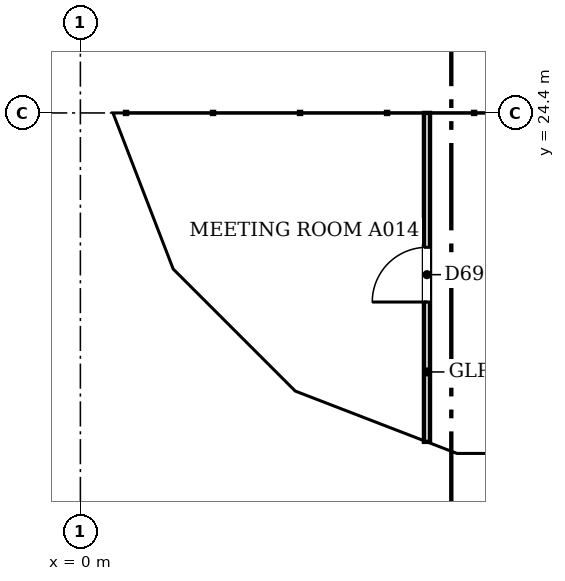
"""IFC4 building model, lengths in metres.
Left out: names, types, materials, properties, quantities, classifications, styles, units other than length and angle.
Written with IfcOpenShell. Run it as: python <this file> out.ifc"""

import sys

from ifc_helpers import new_model, si_unit, direction, frame, frame_2d, origin, place, context, subcontext, project, spatial, polyline, rectangle, outline, extrude, faceted_brep, source, transform, mapped, element, fill, save


model = new_model("IFC4")
c1 = context("Model", 3, precision=1e-05, world=origin(), true_north=direction((0.0, 1.0)))
c2 = subcontext(c1, "Body", "Model", "MODEL_VIEW")
j1 = project(units=[si_unit("LENGTHUNIT", "METRE"), si_unit("PLANEANGLEUNIT", "RADIAN")], contexts=[c1])
p1 = place(None, origin())
s1 = spatial("IfcSite", under=j1, at=p1, CompositionType="ELEMENT")
p2 = place(p1, origin())
s2 = spatial("IfcBuilding", under=s1, at=p2, CompositionType="ELEMENT")
p3 = place(p2, frame((0.0, 0.0, 197.9)))
s3 = spatial("IfcBuildingStorey", under=s2, at=p3, CompositionType="ELEMENT", Elevation=197.9)
m1 = source(origin(), c2, "Body", "Brep", [
    faceted_brep([(6.053, -0.25, 0.0), (3.05, -0.25, 3.8), (0.0, -0.25, 0.0), (0.0, 0.25, 0.0), (3.05, 0.25, 3.8), (6.007, 0.25, 0.059), (6.007, 0.25, 0.0), (6.053, 0.0, 0.0)], [[[0, 1, 2]], [[3, 4, 5, 6]], [[5, 4, 1, 0, 7]], [[4, 3, 2, 1]], [[3, 6, 7, 0, 2]], [[7, 6, 5]]]),
])
p4 = place(p3, frame((0.25, 30.5, 0.0), z_axis=(0.0, 0.0, 1.0), x_axis=(0.0, -1.0, 0.0)))
e1 = element("IfcWall", 1, at=p4, inside=s3, PredefinedType="SOLIDWALL", context=c2, shape_type="MappedRepresentation", body=[
    mapped(m1, transform((0.0, 0.0, 0.0), scale=1.0)),
])
m2 = source(origin(), c2, "Body", "SweptSolid", [
    extrude(outline(polyline([(5.537, 0.25), (3.049, 3.399), (0.521, 0.25), (5.537, 0.25)])), frame((0.0, 0.26, 0.0), z_axis=(0.0, -1.0, 0.0), x_axis=(1.0, 0.0, 0.0)), (0.0, 0.0, 1.0), 0.52),
])
p5 = place(p4, origin())
e2 = element("IfcOpeningElement", 2, at=p5, cuts=e1, PredefinedType="OPENING", context=c2, shape_type="MappedRepresentation", body=[
    mapped(m2, transform((0.0, 0.0, 0.0), scale=1.0)),
])
m3 = source(origin(), c2, "Body", "Brep", [
    faceted_brep([(3.003, -0.25, 3.732), (2.95, -0.25, 3.8), (0.0, -0.25, 0.0), (3.003, -0.25, 0.0), (0.047, 0.25, 0.06), (2.898, 0.25, 3.732), (2.898, 0.25, 0.0), (0.047, 0.25, 0.0), (2.95, 0.0, 3.8), (0.0, 0.0, 0.0)], [[[0, 1, 2, 3]], [[4, 5, 6, 7]], [[8, 1, 0]], [[5, 4, 9, 2, 1, 8]], [[7, 6, 3, 2, 9]], [[7, 9, 4]], [[3, 6, 5, 8, 0]]]),
])
p6 = place(p3, frame((0.25, 24.447, 0.0), z_axis=(0.0, 0.0, 1.0), x_axis=(0.35992665181, -0.932980602862, 0.0)))
e3 = element("IfcWall", 3, at=p6, inside=s3, PredefinedType="SOLIDWALL", context=c2, shape_type="MappedRepresentation", body=[
    mapped(m3, transform((0.0, 0.0, 0.0), scale=1.0)),
])
m4 = source(origin(), c2, "Body", "SweptSolid", [
    extrude(outline(polyline([(2.75, 3.135), (0.511, 0.25), (2.75, 0.25), (2.75, 3.135)])), frame((0.0, 0.26, 0.0), z_axis=(0.0, -1.0, 0.0), x_axis=(1.0, 0.0, 0.0)), (0.0, 0.0, 1.0), 0.52),
])
p7 = place(p6, origin())
e4 = element("IfcOpeningElement", 4, at=p7, cuts=e3, PredefinedType="OPENING", context=c2, shape_type="MappedRepresentation", body=[
    mapped(m4, transform((0.0, 0.0, 0.0), scale=1.0)),
])
m5 = source(origin(), c2, "Body", "Brep", [
    faceted_brep([(2.997, -0.25, 0.0), (0.053, -0.25, 3.8), (0.0, -0.25, 3.732), (0.0, -0.25, 0.0), (0.106, 0.25, 3.732), (2.944, 0.25, 0.068), (2.944, 0.25, 0.0), (0.106, 0.25, 0.0), (0.053, 0.0, 3.8), (2.997, 0.0, 0.0)], [[[0, 1, 2, 3]], [[4, 5, 6, 7]], [[5, 4, 8, 1, 0, 9]], [[2, 1, 8]], [[7, 6, 9, 0, 3]], [[7, 3, 2, 8, 4]], [[9, 6, 5]]]),
])
p8 = place(p3, frame((1.274, 21.731, 0.0), z_axis=(0.0, 0.0, 1.0), x_axis=(0.707147509625, -0.707066050402, 0.0)))
e5 = element("IfcWall", 5, at=p8, inside=s3, PredefinedType="SOLIDWALL", context=c2, shape_type="MappedRepresentation", body=[
    mapped(m5, transform((0.0, 0.0, 0.0), scale=1.0)),
])
m6 = source(origin(), c2, "Body", "SweptSolid", [
    extrude(outline(polyline([(2.487, 0.25), (0.253, 3.134), (0.253, 0.25), (2.487, 0.25)])), frame((0.0, 0.26, 0.0), z_axis=(0.0, -1.0, 0.0), x_axis=(1.0, 0.0, 0.0)), (0.0, 0.0, 1.0), 0.52),
])
p9 = place(p8, origin())
e6 = element("IfcOpeningElement", 6, at=p9, cuts=e5, PredefinedType="OPENING", context=c2, shape_type="MappedRepresentation", body=[
    mapped(m6, transform((0.0, 0.0, 0.0), scale=1.0)),
])
m7 = source(origin(), c2, "Body", "Brep", [
    faceted_brep([(2.997, -0.25, 3.741), (2.95, -0.25, 3.8), (0.0, -0.25, 0.0), (2.997, -0.25, 0.0), (0.053, 0.25, 0.068), (2.904, 0.25, 3.74), (2.904, 0.25, 0.0), (0.053, 0.25, 0.0), (2.95, 0.0, 3.8), (0.0, 0.0, 0.0)], [[[0, 1, 2, 3]], [[4, 5, 6, 7]], [[8, 1, 0]], [[5, 4, 9, 2, 1, 8]], [[7, 6, 3, 2, 9]], [[7, 9, 4]], [[3, 6, 5, 8, 0]]]),
])
p10 = place(p3, frame((3.394, 19.612, 0.0), z_axis=(0.0, 0.0, 1.0), x_axis=(0.932990326376, -0.359901446078, 0.0)))
e7 = element("IfcWall", 7, at=p10, inside=s3, PredefinedType="SOLIDWALL", context=c2, shape_type="MappedRepresentation", body=[
    mapped(m7, transform((0.0, 0.0, 0.0), scale=1.0)),
])
p11 = place(p10, origin())
e8 = element("IfcOpeningElement", 8, at=p11, cuts=e7, PredefinedType="OPENING", context=c2, shape_type="MappedRepresentation", body=[
    mapped(m4, transform((0.0, 0.0, 0.0), scale=1.0)),
])
m8 = source(origin(), c2, "Body", "Brep", [
    faceted_brep([(3.05, -0.25, 0.0), (0.047, -0.25, 3.8), (0.0, -0.25, 3.74), (0.0, -0.25, 0.0), (0.093, 0.25, 3.741), (3.05, 0.25, 0.0), (0.093, 0.25, 0.0), (0.047, 0.0, 3.8)], [[[0, 1, 2, 3]], [[4, 5, 6]], [[5, 4, 7, 1, 0]], [[2, 1, 7]], [[6, 5, 0, 3]], [[6, 3, 2, 7, 4]]]),
])
p12 = place(p3, frame((6.1, 18.55, 0.0), z_axis=(0.0, 0.0, 1.0), x_axis=(1.0, 0.0, 0.0)))
e9 = element("IfcWall", 9, at=p12, inside=s3, PredefinedType="SOLIDWALL", context=c2, shape_type="MappedRepresentation", body=[
    mapped(m8, transform((0.0, 0.0, 0.0), scale=1.0)),
])
m9 = source(origin(), c2, "Body", "SweptSolid", [
    extrude(outline(polyline([(2.534, 0.25), (0.247, 3.144), (0.247, 0.25), (2.534, 0.25)])), frame((0.0, 0.26, 0.0), z_axis=(0.0, -1.0, 0.0), x_axis=(1.0, 0.0, 0.0)), (0.0, 0.0, 1.0), 0.52),
])
p13 = place(p12, origin())
e10 = element("IfcOpeningElement", 10, at=p13, cuts=e9, PredefinedType="OPENING", context=c2, shape_type="MappedRepresentation", body=[
    mapped(m9, transform((0.0, 0.0, 0.0), scale=1.0)),
])
p14 = place(p2, frame((0.0, 0.0, 201.7)))
s4 = spatial("IfcBuildingStorey", under=s2, at=p14, CompositionType="ELEMENT", Elevation=201.7)
m10 = source(origin(), c2, "Body", "Brep", [
    faceted_brep([(3.003, -0.25, 0.0), (3.05, -0.25, 0.06), (3.05, -0.25, 7.54), (3.003, -0.25, 7.6), (0.0, -0.25, 3.8), (0.0, 0.25, 3.8), (2.957, 0.25, 7.541), (2.957, 0.25, 0.059), (3.003, 0.0, 0.0), (3.003, 0.0, 7.6)], [[[0, 1, 2, 3, 4]], [[5, 6, 7]], [[1, 0, 8]], [[9, 3, 2]], [[6, 5, 4, 3, 9]], [[5, 7, 8, 0, 4]], [[1, 8, 7, 6, 9, 2]]]),
])
p15 = place(p14, frame((0.25, 27.45, -3.8), z_axis=(0.0, 0.0, 1.0), x_axis=(0.0, -1.0, 0.0)))
e11 = element("IfcWall", 11, at=p15, inside=s4, PredefinedType="SOLIDWALL", context=c2, shape_type="MappedRepresentation", body=[
    mapped(m10, transform((0.0, 0.0, 0.0), scale=1.0)),
])
m11 = source(origin(), c2, "Body", "SweptSolid", [
    extrude(outline(polyline([(2.803, 6.944), (0.319, 3.8), (2.803, 0.656), (2.803, 6.944)])), frame((0.0, 0.26, 0.0), z_axis=(0.0, -1.0, 0.0), x_axis=(1.0, 0.0, 0.0)), (0.0, 0.0, 1.0), 0.52),
])
p16 = place(p15, origin())
e12 = element("IfcOpeningElement", 12, at=p16, cuts=e11, PredefinedType="OPENING", context=c2, shape_type="MappedRepresentation", body=[
    mapped(m11, transform((0.0, 0.0, 0.0), scale=1.0)),
])
m12 = source(origin(), c2, "Body", "Brep", [
    faceted_brep([(0.047, -0.25, 0.0), (2.997, -0.25, 3.8), (0.047, -0.25, 7.6), (0.0, -0.25, 7.541), (0.0, -0.25, 0.059), (0.093, 0.25, 7.54), (2.944, 0.25, 3.868), (2.944, 0.25, 3.732), (0.093, 0.25, 0.06), (2.997, 0.0, 3.8), (0.047, 0.0, 0.0), (0.047, 0.0, 7.6)], [[[0, 1, 2, 3, 4]], [[5, 6, 7, 8]], [[8, 7, 9, 1, 0, 10]], [[6, 5, 11, 2, 1, 9]], [[3, 2, 11]], [[10, 0, 4]], [[8, 10, 4, 3, 11, 5]], [[9, 7, 6]]]),
])
p17 = place(p14, frame((0.233, 24.49, -3.8), z_axis=(0.0, 0.0, 1.0), x_axis=(0.359901446078, -0.932990326376, 0.0)))
e13 = element("IfcWall", 13, at=p17, inside=s4, PredefinedType="SOLIDWALL", context=c2, shape_type="MappedRepresentation", body=[
    mapped(m12, transform((0.0, 0.0, 0.0), scale=1.0)),
])
m13 = source(origin(), c2, "Body", "SweptSolid", [
    extrude(outline(polyline([(0.247, 0.665), (2.681, 3.8), (0.247, 6.935), (0.247, 0.665)])), frame((0.0, 0.26, 0.0), z_axis=(0.0, -1.0, 0.0), x_axis=(1.0, 0.0, 0.0)), (0.0, 0.0, 1.0), 0.52),
])
p18 = place(p17, origin())
e14 = element("IfcOpeningElement", 14, at=p18, cuts=e13, PredefinedType="OPENING", context=c2, shape_type="MappedRepresentation", body=[
    mapped(m13, transform((0.0, 0.0, 0.0), scale=1.0)),
])
m14 = source(origin(), c2, "Body", "Brep", [
    faceted_brep([(2.944, -0.25, 0.0), (2.997, -0.25, 0.068), (2.997, -0.25, 7.532), (2.944, -0.25, 7.6), (0.0, -0.25, 3.8), (0.053, 0.25, 3.868), (2.891, 0.25, 7.532), (2.891, 0.25, 0.068), (0.053, 0.25, 3.732), (2.944, 0.0, 0.0), (2.944, 0.0, 7.6), (0.0, 0.0, 3.8)], [[[0, 1, 2, 3, 4]], [[5, 6, 7, 8]], [[1, 0, 9]], [[10, 3, 2]], [[6, 5, 11, 4, 3, 10]], [[8, 7, 9, 0, 4, 11]], [[8, 11, 5]], [[1, 9, 7, 6, 10, 2]]]),
])
p19 = place(p14, frame((1.312, 21.694, -3.8), z_axis=(0.0, 0.0, 1.0), x_axis=(0.707066050402, -0.707147509625, 0.0)))
e15 = element("IfcWall", 15, at=p19, inside=s4, PredefinedType="SOLIDWALL", context=c2, shape_type="MappedRepresentation", body=[
    mapped(m14, transform((0.0, 0.0, 0.0), scale=1.0)),
])
m15 = source(origin(), c2, "Body", "SweptSolid", [
    extrude(outline(polyline([(2.744, 6.934), (0.316, 3.8), (2.744, 0.667), (2.744, 6.934)])), frame((0.0, 0.26, 0.0), z_axis=(0.0, -1.0, 0.0), x_axis=(1.0, 0.0, 0.0)), (0.0, 0.0, 1.0), 0.52),
])
p20 = place(p19, origin())
e16 = element("IfcOpeningElement", 16, at=p20, cuts=e15, PredefinedType="OPENING", context=c2, shape_type="MappedRepresentation", body=[
    mapped(m15, transform((0.0, 0.0, 0.0), scale=1.0)),
])
m16 = source(origin(), c2, "Body", "Brep", [
    faceted_brep([(0.053, -0.25, 0.0), (3.003, -0.25, 3.8), (0.053, -0.25, 7.6), (0.0, -0.25, 7.532), (0.0, -0.25, 0.068), (0.106, 0.25, 7.532), (2.957, 0.25, 3.86), (2.957, 0.25, 3.74), (0.106, 0.25, 0.068), (3.003, 0.0, 3.8), (0.053, 0.0, 0.0), (0.053, 0.0, 7.6)], [[[0, 1, 2, 3, 4]], [[5, 6, 7, 8]], [[8, 7, 9, 1, 0, 10]], [[6, 5, 11, 2, 1, 9]], [[3, 2, 11]], [[10, 0, 4]], [[8, 10, 4, 3, 11, 5]], [[9, 7, 6]]]),
])
p21 = place(p14, frame((3.344, 19.631, -3.8), z_axis=(0.0, 0.0, 1.0), x_axis=(0.933007896601, -0.359855894603, 0.0)))
e17 = element("IfcWall", 17, at=p21, inside=s4, PredefinedType="SOLIDWALL", context=c2, shape_type="MappedRepresentation", body=[
    mapped(m16, transform((0.0, 0.0, 0.0), scale=1.0)),
])
m17 = source(origin(), c2, "Body", "SweptSolid", [
    extrude(outline(polyline([(0.253, 0.665), (2.687, 3.8), (0.253, 6.935), (0.253, 0.665)])), frame((0.0, 0.26, 0.0), z_axis=(0.0, -1.0, 0.0), x_axis=(1.0, 0.0, 0.0)), (0.0, 0.0, 1.0), 0.52),
])
p22 = place(p21, origin())
e18 = element("IfcOpeningElement", 18, at=p22, cuts=e17, PredefinedType="OPENING", context=c2, shape_type="MappedRepresentation", body=[
    mapped(m17, transform((0.0, 0.0, 0.0), scale=1.0)),
])
m18 = source(origin(), c2, "Body", "Brep", [
    faceted_brep([(3.003, -0.25, 0.0), (6.053, -0.25, 3.8), (3.003, -0.25, 7.6), (0.0, -0.25, 3.8), (0.047, 0.25, 3.859), (3.003, 0.25, 7.6), (6.053, 0.25, 3.8), (3.003, 0.25, 0.0), (0.047, 0.25, 3.741), (0.0, 0.0, 3.8)], [[[0, 1, 2, 3]], [[4, 5, 6, 7, 8]], [[7, 6, 1, 0]], [[6, 5, 2, 1]], [[5, 4, 9, 3, 2]], [[8, 7, 0, 3, 9]], [[8, 9, 4]]]),
])
p23 = place(p14, frame((6.146, 18.55, -3.8), z_axis=(0.0, 0.0, 1.0), x_axis=(1.0, 0.0, 0.0)))
e19 = element("IfcWall", 19, at=p23, inside=s4, PredefinedType="SOLIDWALL", context=c2, shape_type="MappedRepresentation", body=[
    mapped(m18, transform((0.0, 0.0, 0.0), scale=1.0)),
])
m19 = source(origin(), c2, "Body", "SweptSolid", [
    extrude(outline(polyline([(3.005, 0.401), (5.733, 3.8), (3.005, 7.199), (0.319, 3.8), (3.005, 0.401)])), frame((0.0, 0.26, 0.0), z_axis=(0.0, -1.0, 0.0), x_axis=(1.0, 0.0, 0.0)), (0.0, 0.0, 1.0), 0.52),
])
p24 = place(p23, origin())
e20 = element("IfcOpeningElement", 20, at=p24, cuts=e19, PredefinedType="OPENING", context=c2, shape_type="MappedRepresentation", body=[
    mapped(m19, transform((0.0, 0.0, 0.0), scale=1.0)),
])
p25 = place(p3, frame((5.7, 18.99, 0.0), z_axis=(0.0, 0.0, 1.0), x_axis=(0.0, 1.0, 0.0)))
e21 = element("IfcWall", 21, at=p25, inside=s3, PredefinedType="PARTITIONING", context=c2, shape_type="SweptSolid", body=[
    extrude(rectangle(XDim=5.41, YDim=0.1, at=frame_2d((2.705, 0.0))), origin(), (0.0, 0.0, 1.0), 3.067),
])
m20 = source(origin(), c2, "Body", "SweptSolid", [
    extrude(rectangle(XDim=0.9, YDim=2.1, at=frame_2d((0.45, 1.05))), frame((0.0, 0.06, 0.0), z_axis=(0.0, -1.0, 0.0), x_axis=(1.0, 0.0, 0.0)), (0.0, 0.0, 1.0), 0.12),
])
p26 = place(p25, frame((2.3, 0.0, 0.0)))
e22 = element("IfcOpeningElement", 22, at=p26, cuts=e21, PredefinedType="OPENING", context=c2, shape_type="MappedRepresentation", body=[
    mapped(m20, transform((0.0, 0.0, 0.0), scale=1.0)),
])
m21 = source(origin(), c2, "Body", "SweptSolid", [
    extrude(rectangle(XDim=0.9, YDim=2.1, at=frame_2d((0.45, 1.05))), frame((0.0, 0.025, 0.0), z_axis=(0.0, -1.0, 0.0), x_axis=(1.0, 0.0, 0.0)), (0.0, 0.0, 1.0), 0.05),
])
p27 = place(p26, origin())
e23 = element("IfcDoor", 23, at=p27, inside=s3, OperationType="SINGLE_SWING_LEFT", PredefinedType="DOOR", context=c2, shape_type="MappedRepresentation", body=[
    mapped(m21, transform((0.0, 0.0, 0.0), scale=1.0)),
])
fill(e22, e23)
save(model, sys.argv[1])
